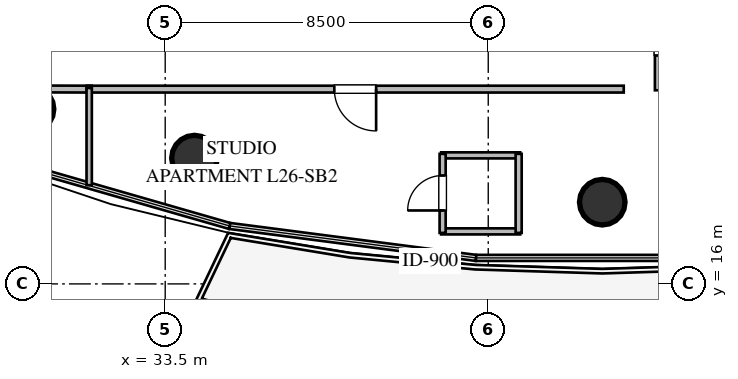
"""IFC4 building model, lengths in metres.
Left out: names, types, materials, properties, quantities, classifications, styles, units other than length and angle.
Written with IfcOpenShell. Run it as: python <this file> out.ifc"""

import sys

from ifc_helpers import new_model, si_unit, direction, frame, frame_2d, origin, origin_2d, place, context, subcontext, project, spatial, rectangle, circle, extrude, element, fill, save


model = new_model("IFC4")
c1 = context("Model", 3, precision=1e-05, world=origin(), true_north=direction((0.0, 1.0)))
c2 = subcontext(c1, "Body", "Model", "MODEL_VIEW")
j1 = project(units=[si_unit("LENGTHUNIT", "METRE"), si_unit("PLANEANGLEUNIT", "RADIAN")], contexts=[c1])
p1 = place(None, origin())
s1 = spatial("IfcSite", under=j1, at=p1, CompositionType="ELEMENT")
p2 = place(p1, origin())
s2 = spatial("IfcBuilding", under=s1, at=p2, CompositionType="ELEMENT")
p3 = place(p2, frame((0.0, 0.0, 102.6)))
s3 = spatial("IfcBuildingStorey", under=s2, at=p3, CompositionType="ELEMENT", Elevation=102.6)
for number, where, z_axis, x_axis in (
    (1, (29.97, 20.6, 0.0), (0.0, 0.0, 1.0), (1.0, 0.0, 0.0)),
    (2, (34.27, 19.31, 0.0), (0.0, 0.0, 1.0), (1.0, 0.0, 0.0)),
    (3, (45.0, 18.15, 0.0), (0.0, 0.0, 1.0), (1.0, 0.0, 0.0)),
):
    element("IfcColumn", number, at=place(p3, frame(where, z_axis=z_axis, x_axis=x_axis)), inside=s3, PredefinedType="COLUMN", context=c2, shape_type="SweptSolid", body=[
        extrude(circle(Radius=0.6, at=origin_2d()), origin(), (0.0, 0.0, 1.0), 3.6),
    ])
for number, where, z_axis, x_axis in (
    (4, (40.76, 17.382, 0.0), (0.0, 0.0, 1.0), (1.0, 0.0, 0.0)),
    (5, (40.76, 19.382, 0.0), (0.0, 0.0, 1.0), (1.0, 0.0, 0.0)),
):
    element("IfcWall", number, at=place(p3, frame(where, z_axis=z_axis, x_axis=x_axis)), inside=s3, PredefinedType="PLUMBINGWALL", context=c2, shape_type="SweptSolid", body=[
        extrude(rectangle(XDim=2.08, YDim=0.16, at=frame_2d((1.04, 0.0))), origin(), (0.0, 0.0, 1.0), 3.36),
    ])
p4 = place(p3, frame((40.8, 17.342, 0.0), z_axis=(0.0, 0.0, 1.0), x_axis=(0.0, 1.0, 0.0)))
e6 = element("IfcWall", 6, at=p4, inside=s3, PredefinedType="PLUMBINGWALL", context=c2, shape_type="SweptSolid", body=[
    extrude(rectangle(XDim=2.08, YDim=0.16, at=frame_2d((1.04, 0.0))), origin(), (0.0, 0.0, 1.0), 3.36),
])
p5 = place(p4, frame((0.59, 0.0, 0.0)))
e7 = element("IfcOpeningElement", 7, at=p5, cuts=e6, PredefinedType="OPENING", context=c2, shape_type="SweptSolid", body=[
    extrude(rectangle(XDim=0.92, YDim=2.1, at=frame_2d((0.46, 1.05))), frame((0.0, 0.09, 0.0), z_axis=(0.0, -1.0, 0.0), x_axis=(1.0, 0.0, 0.0)), (0.0, 0.0, 1.0), 0.18),
])
p6 = place(p3, frame((42.8, 17.342, 0.0), z_axis=(0.0, 0.0, 1.0), x_axis=(0.0, 1.0, 0.0)))
e8 = element("IfcWall", 8, at=p6, inside=s3, PredefinedType="PLUMBINGWALL", context=c2, shape_type="SweptSolid", body=[
    extrude(rectangle(XDim=2.08, YDim=0.16, at=frame_2d((1.04, 0.0))), origin(), (0.0, 0.0, 1.0), 3.36),
])
p7 = place(p3, frame((46.475, 24.125, 0.0), z_axis=(0.0, 0.0, 1.0), x_axis=(0.0, -1.0, 0.0)))
e9 = element("IfcWall", 9, at=p7, inside=s3, PredefinedType="PARTITIONING", context=c2, shape_type="SweptSolid", body=[
    extrude(rectangle(XDim=3.03, YDim=0.18, at=frame_2d((1.515, 0.0))), origin(), (0.0, 0.0, 1.0), 3.36),
])
p8 = place(p7, frame((0.915, 0.0, 0.0)))
e10 = element("IfcOpeningElement", 10, at=p8, cuts=e9, PredefinedType="OPENING", context=c2, shape_type="SweptSolid", body=[
    extrude(rectangle(XDim=1.2, YDim=2.15, at=frame_2d((0.6, 1.075))), frame((0.0, 0.1, 0.0), z_axis=(0.0, -1.0, 0.0), x_axis=(1.0, 0.0, 0.0)), (0.0, 0.0, 1.0), 0.2),
])
p9 = place(p3, frame((31.565, 21.125, 0.0), z_axis=(0.0, 0.0, 1.0), x_axis=(-0.99999586769, 0.002874822264, 0.0)))
e11 = element("IfcWall", 11, at=p9, inside=s3, PredefinedType="PARTITIONING", context=c2, shape_type="SweptSolid", body=[
    extrude(rectangle(XDim=6.624, YDim=0.18, at=frame_2d((3.312, 0.0))), origin(), (0.0, 0.0, 1.0), 2.657),
])
p10 = place(p9, frame((3.562, 0.0, 0.0)))
e12 = element("IfcOpeningElement", 12, at=p10, cuts=e11, PredefinedType="OPENING", context=c2, shape_type="SweptSolid", body=[
    extrude(rectangle(XDim=1.1, YDim=2.1, at=frame_2d((0.55, 1.05))), frame((0.0, 0.1, 0.0), z_axis=(0.0, -1.0, 0.0), x_axis=(1.0, 0.0, 0.0)), (0.0, 0.0, 1.0), 0.2),
])
p11 = place(p3, frame((45.565, 21.125, 0.0), z_axis=(0.0, 0.0, 1.0), x_axis=(-1.0, 0.0, 0.0)))
e13 = element("IfcWall", 13, at=p11, inside=s3, PredefinedType="PARTITIONING", context=c2, shape_type="SweptSolid", body=[
    extrude(rectangle(XDim=14.13, YDim=0.18, at=frame_2d((7.065, 0.0))), origin(), (0.0, 0.0, 1.0), 2.996),
])
p12 = place(p11, frame((6.515, 0.0, 0.0)))
e14 = element("IfcOpeningElement", 14, at=p12, cuts=e13, PredefinedType="OPENING", context=c2, shape_type="SweptSolid", body=[
    extrude(rectangle(XDim=1.1, YDim=2.1, at=frame_2d((0.55, 1.05))), frame((0.0, 0.1, 0.0), z_axis=(0.0, -1.0, 0.0), x_axis=(1.0, 0.0, 0.0)), (0.0, 0.0, 1.0), 0.2),
])
p13 = place(p3, frame((31.5, 21.155, 0.0), z_axis=(0.0, 0.0, 1.0), x_axis=(0.0, -1.0, 0.0)))
e15 = element("IfcWall", 15, at=p13, inside=s3, PredefinedType="PARTITIONING", context=c2, shape_type="SweptSolid", body=[
    extrude(rectangle(XDim=2.558, YDim=0.14, at=frame_2d((1.279, 0.0))), origin(), (0.0, 0.0, 1.0), 3.36),
])
p14 = place(p5, origin())
e16 = element("IfcDoor", 16, at=p14, inside=s3, OperationType="SINGLE_SWING_LEFT", PredefinedType="DOOR", context=c2, shape_type="SweptSolid", body=[
    extrude(rectangle(XDim=0.92, YDim=2.1, at=frame_2d((0.46, 1.05))), frame((0.0, 0.025, 0.0), z_axis=(0.0, -1.0, 0.0), x_axis=(1.0, 0.0, 0.0)), (0.0, 0.0, 1.0), 0.05),
])
fill(e7, e16)
p15 = place(p8, origin())
e17 = element("IfcDoor", 17, at=p15, inside=s3, OperationType="SINGLE_SWING_LEFT", PredefinedType="DOOR", context=c2, shape_type="SweptSolid", body=[
    extrude(rectangle(XDim=1.2, YDim=2.15, at=frame_2d((0.6, 1.075))), frame((0.0, 0.025, 0.0), z_axis=(0.0, -1.0, 0.0), x_axis=(1.0, 0.0, 0.0)), (0.0, 0.0, 1.0), 0.05),
])
fill(e10, e17)
p16 = place(p12, origin())
e18 = element("IfcDoor", 18, at=p16, inside=s3, OperationType="SINGLE_SWING_LEFT", PredefinedType="DOOR", context=c2, shape_type="SweptSolid", body=[
    extrude(rectangle(XDim=1.1, YDim=2.1, at=frame_2d((0.55, 1.05))), frame((0.0, 0.025, 0.0), z_axis=(0.0, -1.0, 0.0), x_axis=(1.0, 0.0, 0.0)), (0.0, 0.0, 1.0), 0.05),
])
fill(e14, e18)
save(model, sys.argv[1])
